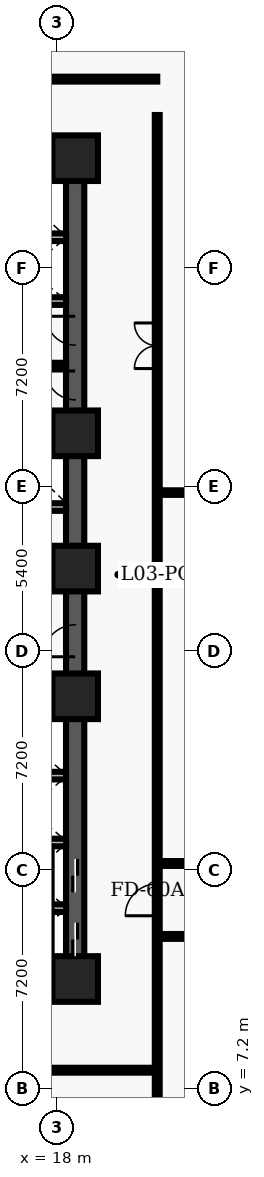
"""IFC4 building model, lengths in metres.
Left out: names, types, materials, properties, quantities, classifications, styles, units other than length and angle.
Written with IfcOpenShell. Run it as: python <this file> out.ifc"""

import sys

from ifc_helpers import new_model, entity, si_unit, converted_unit, direction, frame, origin_with_axes, origin_2d_with_axis, place, context, subcontext, project, spatial, polyline, rectangle, outline, extrude, element, fill, save


model = new_model("IFC4")
c1 = context("Model", 3, precision=1e-05, world=origin_with_axes(), true_north=direction((0.0, 1.0)))
c2 = subcontext(c1, "Body", "Model", "MODEL_VIEW")
j1 = project(units=[si_unit("LENGTHUNIT", "METRE"), converted_unit("PLANEANGLEUNIT", "DEGREE", entity("IfcPlaneAngleMeasure", 0.017), si_unit("PLANEANGLEUNIT", "RADIAN"), dimensions=[0, 0, 0, 0, 0, 0, 0])], contexts=[c1])
p1 = place(None, origin_with_axes())
s1 = spatial("IfcSite", under=j1, at=p1, CompositionType="ELEMENT")
p2 = place(p1, origin_with_axes())
s2 = spatial("IfcBuilding", under=s1, at=p2, CompositionType="ELEMENT")
p3 = place(p2, frame((0.0, 0.0, 15.3), z_axis=(0.0, 0.0, 1.0), x_axis=(1.0, 0.0, 0.0)))
s3 = spatial("IfcBuildingStorey", under=s2, at=p3, CompositionType="ELEMENT", Elevation=15.3)
p4 = place(p3, frame((11.4, 10.8, 0.0), z_axis=(0.0, 0.0, 1.0), x_axis=(1.0, 0.0, 0.0)))
e1 = element("IfcWall", 1, at=p4, inside=s3, PredefinedType="SHEAR", context=c2, shape_type="SweptSolid", body=[
    extrude(outline(polyline([(0.0, -0.3), (7.2, -0.3), (7.2, 0.3), (0.0, 0.3), (0.0, -0.3)])), origin_with_axes(), (0.0, 0.0, 1.0), 4.26),
])
p5 = place(p4, frame((2.625, 0.0, 0.0), z_axis=(0.0, 0.0, 1.0), x_axis=(1.0, 0.0, 0.0)))
e2 = element("IfcOpeningElement", 2, at=p5, cuts=e1, PredefinedType="OPENING", context=c2, shape_type="SweptSolid", body=[
    extrude(rectangle(XDim=1.05, YDim=0.62, at=origin_2d_with_axis()), origin_with_axes(), (0.0, 0.0, 1.0), 2.15),
])
p6 = place(p3, frame((11.4, 37.8, 0.0), z_axis=(0.0, 0.0, 1.0), x_axis=(1.0, 0.0, 0.0)))
e3 = element("IfcWall", 3, at=p6, inside=s3, PredefinedType="SHEAR", context=c2, shape_type="SweptSolid", body=[
    extrude(outline(polyline([(0.0, -0.3), (7.2, -0.3), (7.2, 0.3), (0.0, 0.3), (0.0, -0.3)])), origin_with_axes(), (0.0, 0.0, 1.0), 4.26),
])
p7 = place(p6, frame((2.625, 0.0, 0.0), z_axis=(0.0, 0.0, 1.0), x_axis=(1.0, 0.0, 0.0)))
e4 = element("IfcOpeningElement", 4, at=p7, cuts=e3, PredefinedType="OPENING", context=c2, shape_type="SweptSolid", body=[
    extrude(rectangle(XDim=1.05, YDim=0.62, at=origin_2d_with_axis()), origin_with_axes(), (0.0, 0.0, 1.0), 2.15),
])
p8 = place(p3, frame((18.6, 10.8, 0.0), z_axis=(0.0, 0.0, 1.0), x_axis=(0.0, 1.0, 0.0)))
e5 = element("IfcWall", 5, at=p8, inside=s3, PredefinedType="SHEAR", context=c2, shape_type="SweptSolid", body=[
    extrude(outline(polyline([(0.0, -0.3), (13.5, -0.3), (13.5, 0.3), (0.0, 0.3), (0.0, -0.3)])), origin_with_axes(), (0.0, 0.0, 1.0), 4.26),
])
p9 = place(p8, frame((1.3, 0.0, 0.0), z_axis=(0.0, 0.0, 1.0), x_axis=(1.0, 0.0, 0.0)))
e6 = element("IfcOpeningElement", 6, at=p9, cuts=e5, PredefinedType="OPENING", context=c2, shape_type="SweptSolid", body=[
    extrude(rectangle(XDim=1.1, YDim=0.62, at=origin_2d_with_axis()), origin_with_axes(), (0.0, 0.0, 1.0), 2.15),
])
p10 = place(p8, frame((3.4, 0.0, 0.0), z_axis=(0.0, 0.0, 1.0), x_axis=(1.0, 0.0, 0.0)))
e7 = element("IfcOpeningElement", 7, at=p10, cuts=e5, PredefinedType="OPENING", context=c2, shape_type="SweptSolid", body=[
    extrude(rectangle(XDim=1.1, YDim=0.62, at=origin_2d_with_axis()), origin_with_axes(), (0.0, 0.0, 1.0), 2.15),
])
p11 = place(p8, frame((11.125, 0.0, 0.0), z_axis=(0.0, 0.0, 1.0), x_axis=(1.0, 0.0, 0.0)))
e8 = element("IfcOpeningElement", 8, at=p11, cuts=e5, PredefinedType="OPENING", context=c2, shape_type="SweptSolid", body=[
    extrude(rectangle(XDim=1.05, YDim=0.62, at=origin_2d_with_axis()), origin_with_axes(), (0.0, 0.0, 1.0), 2.15),
])
p12 = place(p3, frame((18.6, 24.3, 0.0), z_axis=(0.0, 0.0, 1.0), x_axis=(0.0, 1.0, 0.0)))
e9 = element("IfcWall", 9, at=p12, inside=s3, PredefinedType="SHEAR", context=c2, shape_type="SweptSolid", body=[
    extrude(outline(polyline([(0.0, -0.3), (13.5, -0.3), (13.5, 0.3), (0.0, 0.3), (0.0, -0.3)])), origin_with_axes(), (0.0, 0.0, 1.0), 4.26),
])
p13 = place(p12, frame((6.025, 0.0, 0.0), z_axis=(0.0, 0.0, 1.0), x_axis=(1.0, 0.0, 0.0)))
e10 = element("IfcOpeningElement", 10, at=p13, cuts=e9, PredefinedType="OPENING", context=c2, shape_type="SweptSolid", body=[
    extrude(rectangle(XDim=0.95, YDim=0.62, at=origin_2d_with_axis()), origin_with_axes(), (0.0, 0.0, 1.0), 2.15),
])
p14 = place(p12, frame((7.825, 0.0, 0.0), z_axis=(0.0, 0.0, 1.0), x_axis=(1.0, 0.0, 0.0)))
e11 = element("IfcOpeningElement", 11, at=p14, cuts=e9, PredefinedType="OPENING", context=c2, shape_type="SweptSolid", body=[
    extrude(rectangle(XDim=0.95, YDim=0.62, at=origin_2d_with_axis()), origin_with_axes(), (0.0, 0.0, 1.0), 2.15),
])
for number, where, z_axis, x_axis in (
    (12, (11.7, 19.825, 0.0), (0.0, 0.0, 1.0), (1.0, 0.0, 0.0)),
    (13, (11.7, 28.775, 0.0), (0.0, 0.0, 1.0), (1.0, 0.0, 0.0)),
):
    element("IfcWall", number, at=place(p3, frame(where, z_axis=z_axis, x_axis=x_axis)), inside=s3, PredefinedType="SHEAR", context=c2, shape_type="SweptSolid", body=[
        extrude(outline(polyline([(0.0, -0.125), (6.6, -0.125), (6.6, 0.125), (0.0, 0.125), (0.0, -0.125)])), origin_with_axes(), (0.0, 0.0, 1.0), 4.26),
    ])
p15 = place(p3, frame((11.7, 24.1, 0.0), z_axis=(0.0, 0.0, 1.0), x_axis=(1.0, 0.0, 0.0)))
e14 = element("IfcWall", 14, at=p15, inside=s3, PredefinedType="SOLIDWALL", context=c2, shape_type="SweptSolid", body=[
    extrude(outline(polyline([(0.0, -0.125), (6.6, -0.125), (6.6, 0.125), (0.0, 0.125), (0.0, -0.125)])), origin_with_axes(), (0.0, 0.0, 1.0), 3.3),
])
p16 = place(p15, frame((3.6, 0.0, 0.0), z_axis=(0.0, 0.0, 1.0), x_axis=(1.0, 0.0, 0.0)))
e15 = element("IfcOpeningElement", 15, at=p16, cuts=e14, PredefinedType="OPENING", context=c2, shape_type="SweptSolid", body=[
    extrude(rectangle(XDim=0.9, YDim=0.27, at=origin_2d_with_axis()), origin_with_axes(), (0.0, 0.0, 1.0), 2.15),
])
p17 = place(p15, frame((5.65, 0.0, 0.0), z_axis=(0.0, 0.0, 1.0), x_axis=(1.0, 0.0, 0.0)))
e16 = element("IfcOpeningElement", 16, at=p17, cuts=e14, PredefinedType="OPENING", context=c2, shape_type="SweptSolid", body=[
    extrude(rectangle(XDim=0.9, YDim=0.27, at=origin_2d_with_axis()), origin_with_axes(), (0.0, 0.0, 1.0), 2.15),
])
p18 = place(p3, frame((11.7, 26.325, 0.0), z_axis=(0.0, 0.0, 1.0), x_axis=(1.0, 0.0, 0.0)))
e17 = element("IfcWall", 17, at=p18, inside=s3, PredefinedType="SOLIDWALL", context=c2, shape_type="SweptSolid", body=[
    extrude(outline(polyline([(0.0, -0.125), (6.6, -0.125), (6.6, 0.125), (0.0, 0.125), (0.0, -0.125)])), origin_with_axes(), (0.0, 0.0, 1.0), 3.3),
])
p19 = place(p18, frame((3.5, 0.0, 0.0), z_axis=(0.0, 0.0, 1.0), x_axis=(1.0, 0.0, 0.0)))
e18 = element("IfcOpeningElement", 18, at=p19, cuts=e17, PredefinedType="OPENING", context=c2, shape_type="SweptSolid", body=[
    extrude(rectangle(XDim=0.9, YDim=0.27, at=origin_2d_with_axis()), origin_with_axes(), (0.0, 0.0, 1.0), 2.15),
])
for number, where, z_axis, x_axis in (
    (19, (18.6, 10.8, 0.0), (0.0, 0.0, 1.0), (1.0, 0.0, 0.0)),
    (20, (18.6, 20.1, 0.0), (0.0, 0.0, 1.0), (1.0, 0.0, 0.0)),
    (21, (18.6, 24.3, 0.0), (0.0, 0.0, 1.0), (1.0, 0.0, 0.0)),
    (22, (18.6, 28.75, 0.0), (0.0, 0.0, 1.0), (1.0, 0.0, 0.0)),
    (23, (18.6, 37.8, 0.0), (0.0, 0.0, 1.0), (1.0, 0.0, 0.0)),
):
    element("IfcColumn", number, at=place(p3, frame(where, z_axis=z_axis, x_axis=x_axis)), inside=s3, PredefinedType="COLUMN", context=c2, shape_type="SweptSolid", body=[
        extrude(rectangle(XDim=1.5, YDim=1.5, at=origin_2d_with_axis()), origin_with_axes(), (0.0, 0.0, 1.0), 4.5),
    ])
for number, where, z_axis, x_axis in (
    (24, (15.84, 13.13, 0.0), (0.0, 0.0, 1.0), (1.0, 0.0, 0.0)),
    (25, (15.84, 15.29, 0.0), (0.0, 0.0, 1.0), (1.0, 0.0, 0.0)),
    (26, (15.84, 17.49, 0.0), (0.0, 0.0, 1.0), (1.0, 0.0, 0.0)),
    (27, (15.84, 33.1, 0.0), (0.0, 0.0, 1.0), (1.0, 0.0, 0.0)),
    (28, (15.84, 35.2, 0.0), (0.0, 0.0, 1.0), (1.0, 0.0, 0.0)),
):
    element("IfcWall", number, at=place(p3, frame(where, z_axis=z_axis, x_axis=x_axis)), inside=s3, PredefinedType="SOLIDWALL", context=c2, shape_type="SweptSolid", body=[
        extrude(outline(polyline([(0.0, -0.125), (2.46, -0.125), (2.46, 0.125), (0.0, 0.125), (0.0, -0.125)])), origin_with_axes(), (0.0, 0.0, 1.0), 3.2),
    ])
p20 = place(p3, frame((15.84, 31.0, 0.0), z_axis=(0.0, 0.0, 1.0), x_axis=(1.0, 0.0, 0.0)))
e29 = element("IfcWall", 29, at=p20, inside=s3, PredefinedType="PARTITIONING", context=c2, shape_type="SweptSolid", body=[
    extrude(outline(polyline([(0.0, -0.07), (2.46, -0.07), (2.46, 0.07), (0.0, 0.07), (0.0, -0.07)])), origin_with_axes(), (0.0, 0.0, 1.0), 3.2),
])
p21 = place(p3, frame((0.38, 7.8, 0.0), z_axis=(0.0, 0.0, 1.0), x_axis=(1.0, 0.0, 0.0)))
e30 = element("IfcWall", 30, at=p21, inside=s3, PredefinedType="PARTITIONING", context=c2, shape_type="SweptSolid", body=[
    extrude(outline(polyline([(0.0, -0.08), (20.92, -0.08), (20.92, 0.08), (0.0, 0.08), (0.0, -0.08)])), origin_with_axes(), (0.0, 0.0, 1.0), 3.2),
])
p22 = place(p21, frame((3.7, 0.0, 0.0), z_axis=(0.0, 0.0, 1.0), x_axis=(1.0, 0.0, 0.0)))
e31 = element("IfcOpeningElement", 31, at=p22, cuts=e30, PredefinedType="OPENING", context=c2, shape_type="SweptSolid", body=[
    extrude(rectangle(XDim=1.0, YDim=0.18, at=origin_2d_with_axis()), origin_with_axes(), (0.0, 0.0, 1.0), 2.15),
])
p23 = place(p21, frame((15.3, 0.0, 0.0), z_axis=(0.0, 0.0, 1.0), x_axis=(1.0, 0.0, 0.0)))
e32 = element("IfcOpeningElement", 32, at=p23, cuts=e30, PredefinedType="OPENING", context=c2, shape_type="SweptSolid", body=[
    extrude(rectangle(XDim=1.0, YDim=0.18, at=origin_2d_with_axis()), origin_with_axes(), (0.0, 0.0, 1.0), 2.15),
])
p24 = place(p3, frame((0.38, 40.4, 0.0), z_axis=(0.0, 0.0, 1.0), x_axis=(1.0, 0.0, 0.0)))
e33 = element("IfcWall", 33, at=p24, inside=s3, PredefinedType="PARTITIONING", context=c2, shape_type="SweptSolid", body=[
    extrude(outline(polyline([(0.0, -0.08), (20.92, -0.08), (20.92, 0.08), (0.0, 0.08), (0.0, -0.08)])), origin_with_axes(), (0.0, 0.0, 1.0), 3.2),
])
p25 = place(p24, frame((15.25, 0.0, 0.0), z_axis=(0.0, 0.0, 1.0), x_axis=(1.0, 0.0, 0.0)))
e34 = element("IfcOpeningElement", 34, at=p25, cuts=e33, PredefinedType="OPENING", context=c2, shape_type="SweptSolid", body=[
    extrude(rectangle(XDim=1.5, YDim=0.18, at=origin_2d_with_axis()), origin_with_axes(), (0.0, 0.0, 1.0), 2.2),
])
p26 = place(p3, frame((21.3, 0.38, 0.0), z_axis=(0.0, 0.0, 1.0), x_axis=(0.0, 1.0, 0.0)))
e35 = element("IfcWall", 35, at=p26, inside=s3, PredefinedType="PARTITIONING", context=c2, shape_type="SweptSolid", body=[
    extrude(outline(polyline([(0.0, -0.08), (38.84, -0.08), (38.84, 0.08), (0.0, 0.08), (0.0, -0.08)])), origin_with_axes(), (0.0, 0.0, 1.0), 3.2),
])
p27 = place(p26, frame((13.025, 0.0, 0.0), z_axis=(0.0, 0.0, 1.0), x_axis=(1.0, 0.0, 0.0)))
e36 = element("IfcOpeningElement", 36, at=p27, cuts=e35, PredefinedType="OPENING", context=c2, shape_type="SweptSolid", body=[
    extrude(rectangle(XDim=1.05, YDim=0.18, at=origin_2d_with_axis()), origin_with_axes(), (0.0, 0.0, 1.0), 2.15),
])
p28 = place(p26, frame((31.25, 0.0, 0.0), z_axis=(0.0, 0.0, 1.0), x_axis=(1.0, 0.0, 0.0)))
e37 = element("IfcOpeningElement", 37, at=p28, cuts=e35, PredefinedType="OPENING", context=c2, shape_type="SweptSolid", body=[
    extrude(rectangle(XDim=1.5, YDim=0.18, at=origin_2d_with_axis()), origin_with_axes(), (0.0, 0.0, 1.0), 2.2),
])
p29 = place(p3, frame((21.3, 12.2, 0.0), z_axis=(0.0, 0.0, 1.0), x_axis=(1.0, 0.0, 0.0)))
e38 = element("IfcWall", 38, at=p29, inside=s3, PredefinedType="PARTITIONING", context=c2, shape_type="SweptSolid", body=[
    extrude(outline(polyline([(0.0, -0.08), (14.95, -0.08), (14.95, 0.08), (0.0, 0.08), (0.0, -0.08)])), origin_with_axes(), (0.0, 0.0, 1.0), 3.2),
])
p30 = place(p29, frame((8.25, 0.0, 0.0), z_axis=(0.0, 0.0, 1.0), x_axis=(1.0, 0.0, 0.0)))
e39 = element("IfcOpeningElement", 39, at=p30, cuts=e38, PredefinedType="OPENING", context=c2, shape_type="SweptSolid", body=[
    extrude(rectangle(XDim=1.5, YDim=0.18, at=origin_2d_with_axis()), origin_with_axes(), (0.0, 0.0, 1.0), 2.2),
])
p31 = place(p3, frame((21.3, 14.6, 0.0), z_axis=(0.0, 0.0, 1.0), x_axis=(1.0, 0.0, 0.0)))
e40 = element("IfcWall", 40, at=p31, inside=s3, PredefinedType="PARTITIONING", context=c2, shape_type="SweptSolid", body=[
    extrude(outline(polyline([(0.0, -0.08), (14.95, -0.08), (14.95, 0.08), (0.0, 0.08), (0.0, -0.08)])), origin_with_axes(), (0.0, 0.0, 1.0), 3.2),
])
p32 = place(p31, frame((8.25, 0.0, 0.0), z_axis=(0.0, 0.0, 1.0), x_axis=(1.0, 0.0, 0.0)))
e41 = element("IfcOpeningElement", 41, at=p32, cuts=e40, PredefinedType="OPENING", context=c2, shape_type="SweptSolid", body=[
    extrude(rectangle(XDim=1.5, YDim=0.18, at=origin_2d_with_axis()), origin_with_axes(), (0.0, 0.0, 1.0), 2.2),
])
p33 = place(p3, frame((21.3, 26.8, 0.0), z_axis=(0.0, 0.0, 1.0), x_axis=(1.0, 0.0, 0.0)))
e42 = element("IfcWall", 42, at=p33, inside=s3, PredefinedType="PARTITIONING", context=c2, shape_type="SweptSolid", body=[
    extrude(outline(polyline([(0.0, -0.075), (29.25, -0.075), (29.25, 0.075), (0.0, 0.075), (0.0, -0.075)])), origin_with_axes(), (0.0, 0.0, 1.0), 3.2),
])
p34 = place(p8, frame((1.3, 0.0, 0.0), z_axis=(0.0, 0.0, 1.0), x_axis=(1.0, 0.0, 0.0)))
e43 = element("IfcDoor", 43, at=p34, inside=s3, OperationType="SLIDING_TO_LEFT", PredefinedType="DOOR", context=c2, shape_type="SweptSolid", body=[
    extrude(rectangle(XDim=1.1, YDim=0.09, at=origin_2d_with_axis()), origin_with_axes(), (0.0, 0.0, 1.0), 2.15),
])
fill(e6, e43)
p35 = place(p8, frame((3.4, 0.0, 0.0), z_axis=(0.0, 0.0, 1.0), x_axis=(1.0, 0.0, 0.0)))
e44 = element("IfcDoor", 44, at=p35, inside=s3, OperationType="SLIDING_TO_RIGHT", PredefinedType="DOOR", context=c2, shape_type="SweptSolid", body=[
    extrude(rectangle(XDim=1.1, YDim=0.09, at=origin_2d_with_axis()), origin_with_axes(), (0.0, 0.0, 1.0), 2.15),
])
fill(e7, e44)
p36 = place(p8, frame((11.125, 0.0, 0.0), z_axis=(0.0, 0.0, 1.0), x_axis=(1.0, 0.0, 0.0)))
e45 = element("IfcDoor", 45, at=p36, inside=s3, OperationType="SINGLE_SWING_LEFT", PredefinedType="DOOR", context=c2, shape_type="SweptSolid", body=[
    extrude(rectangle(XDim=1.05, YDim=0.09, at=origin_2d_with_axis()), origin_with_axes(), (0.0, 0.0, 1.0), 2.15),
])
fill(e8, e45)
p37 = place(p12, frame((6.025, 0.0, 0.0), z_axis=(0.0, 0.0, 1.0), x_axis=(1.0, 0.0, 0.0)))
e46 = element("IfcDoor", 46, at=p37, inside=s3, OperationType="SINGLE_SWING_RIGHT", PredefinedType="DOOR", context=c2, shape_type="SweptSolid", body=[
    extrude(rectangle(XDim=0.95, YDim=0.09, at=origin_2d_with_axis()), origin_with_axes(), (0.0, 0.0, 1.0), 2.15),
])
fill(e10, e46)
p38 = place(p12, frame((7.825, 0.0, 0.0), z_axis=(0.0, 0.0, 1.0), x_axis=(1.0, 0.0, 0.0)))
e47 = element("IfcDoor", 47, at=p38, inside=s3, OperationType="SINGLE_SWING_RIGHT", PredefinedType="DOOR", context=c2, shape_type="SweptSolid", body=[
    extrude(rectangle(XDim=0.95, YDim=0.09, at=origin_2d_with_axis()), origin_with_axes(), (0.0, 0.0, 1.0), 2.15),
])
fill(e11, e47)
p39 = place(p26, frame((13.025, 0.0, 0.0), z_axis=(0.0, 0.0, 1.0), x_axis=(1.0, 0.0, 0.0)))
e48 = element("IfcDoor", 48, at=p39, inside=s3, OperationType="SINGLE_SWING_LEFT", PredefinedType="DOOR", context=c2, shape_type="SweptSolid", body=[
    extrude(rectangle(XDim=1.05, YDim=0.09, at=origin_2d_with_axis()), origin_with_axes(), (0.0, 0.0, 1.0), 2.15),
])
fill(e36, e48)
p40 = place(p26, frame((31.25, 0.0, 0.0), z_axis=(0.0, 0.0, 1.0), x_axis=(1.0, 0.0, 0.0)))
e49 = element("IfcDoor", 49, at=p40, inside=s3, OperationType="DOUBLE_DOOR_SINGLE_SWING", PredefinedType="DOOR", context=c2, shape_type="SweptSolid", body=[
    extrude(rectangle(XDim=1.5, YDim=0.09, at=origin_2d_with_axis()), origin_with_axes(), (0.0, 0.0, 1.0), 2.2),
])
fill(e37, e49)
save(model, sys.argv[1])
